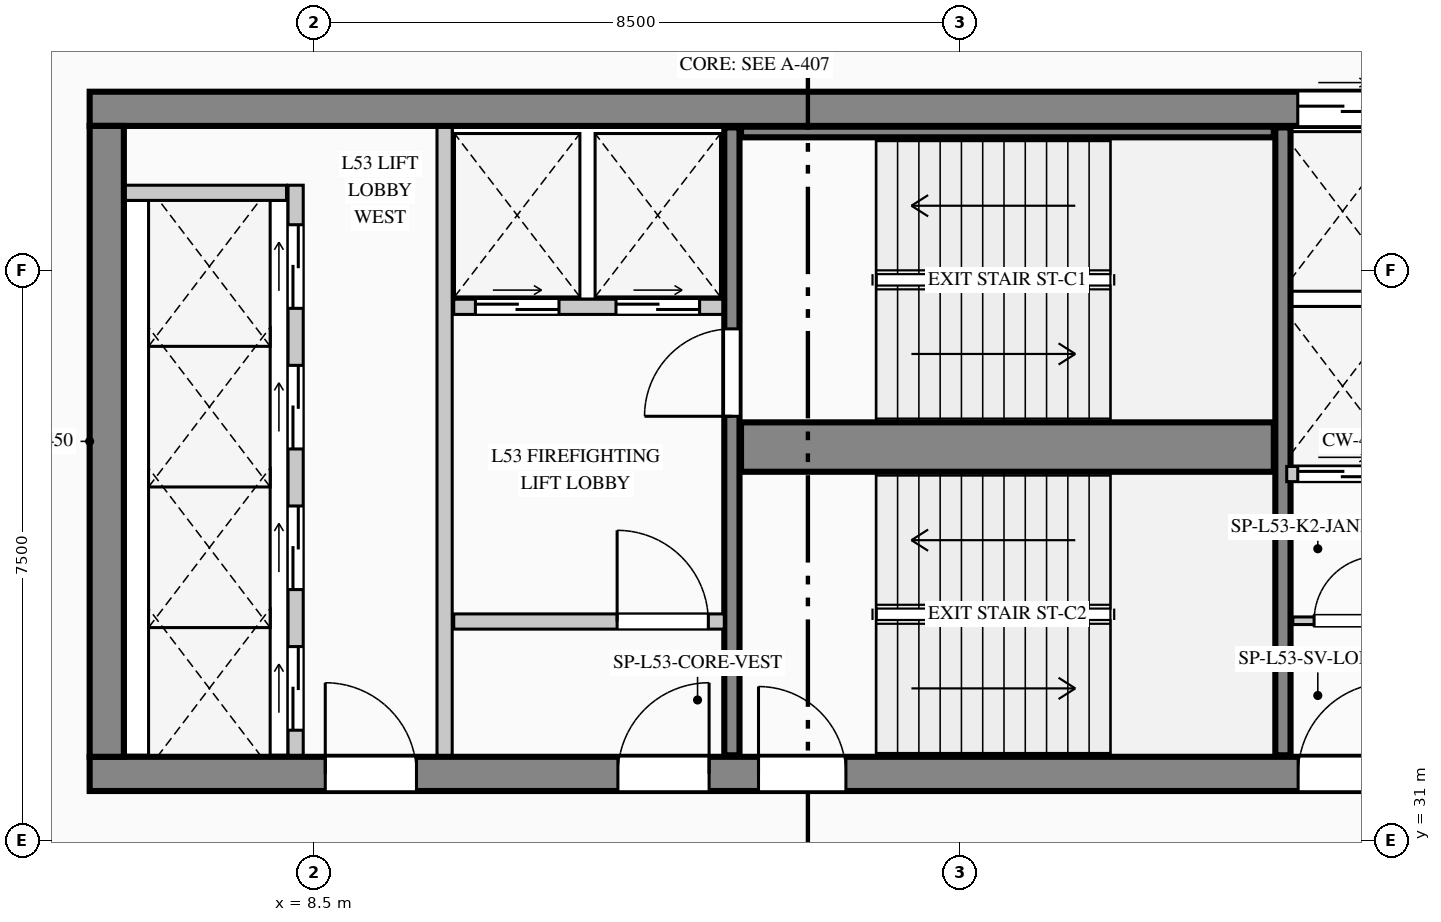
"""IFC4 building model, lengths in metres.
Left out: names, types, materials, properties, quantities, classifications, styles, units other than length and angle.
Written with IfcOpenShell. Run it as: python <this file> out.ifc"""

import sys

from ifc_helpers import new_model, si_unit, direction, frame, frame_2d, origin, place, context, subcontext, project, spatial, rectangle, extrude, element, fill, save


model = new_model("IFC4")
c1 = context("Model", 3, precision=1e-05, world=origin(), true_north=direction((0.0, 1.0)))
c2 = subcontext(c1, "Body", "Model", "MODEL_VIEW")
j1 = project(units=[si_unit("LENGTHUNIT", "METRE"), si_unit("PLANEANGLEUNIT", "RADIAN")], contexts=[c1])
p1 = place(None, origin())
s1 = spatial("IfcSite", under=j1, at=p1, CompositionType="ELEMENT")
p2 = place(p1, origin())
s2 = spatial("IfcBuilding", under=s1, at=p2, CompositionType="ELEMENT")
p3 = place(p2, frame((0.0, 0.0, 223.25)))
s3 = spatial("IfcBuildingStorey", under=s2, at=p3, CompositionType="ELEMENT", Elevation=223.25)
p4 = place(p3, frame((5.55, 40.625, 0.0), z_axis=(0.0, 0.0, 1.0), x_axis=(1.0, 0.0, 0.0)))
e1 = element("IfcWall", 1, at=p4, inside=s3, PredefinedType="SHEAR", context=c2, shape_type="SweptSolid", body=[
    extrude(rectangle(XDim=17.75, YDim=0.45, at=frame_2d((8.875, 0.0))), origin(), (0.0, 0.0, 1.0), 3.95),
])
p5 = place(p4, frame((15.895, 0.0, 0.0)))
e2 = element("IfcOpeningElement", 2, at=p5, cuts=e1, PredefinedType="OPENING", context=c2, shape_type="SweptSolid", body=[
    extrude(rectangle(XDim=1.18, YDim=2.25, at=frame_2d((0.59, 1.125))), frame((0.0, 0.235, 0.0), z_axis=(0.0, -1.0, 0.0), x_axis=(1.0, 0.0, 0.0)), (0.0, 0.0, 1.0), 0.47),
])
p6 = place(p3, frame((5.55, 31.875, 0.0), z_axis=(0.0, 0.0, 1.0), x_axis=(1.0, 0.0, 0.0)))
e3 = element("IfcWall", 3, at=p6, inside=s3, PredefinedType="SHEAR", context=c2, shape_type="SweptSolid", body=[
    extrude(rectangle(XDim=17.75, YDim=0.45, at=frame_2d((8.875, 0.0))), origin(), (0.0, 0.0, 1.0), 3.95),
])
p7 = place(p6, frame((3.1, 0.0, 0.0)))
e4 = element("IfcOpeningElement", 4, at=p7, cuts=e3, PredefinedType="OPENING", context=c2, shape_type="SweptSolid", body=[
    extrude(rectangle(XDim=1.2, YDim=2.2, at=frame_2d((0.6, 1.1))), frame((0.0, 0.235, 0.0), z_axis=(0.0, -1.0, 0.0), x_axis=(1.0, 0.0, 0.0)), (0.0, 0.0, 1.0), 0.47),
])
p8 = place(p6, frame((6.95, 0.0, 0.0)))
e5 = element("IfcOpeningElement", 5, at=p8, cuts=e3, PredefinedType="OPENING", context=c2, shape_type="SweptSolid", body=[
    extrude(rectangle(XDim=1.2, YDim=2.2, at=frame_2d((0.6, 1.1))), frame((0.0, 0.235, 0.0), z_axis=(0.0, -1.0, 0.0), x_axis=(1.0, 0.0, 0.0)), (0.0, 0.0, 1.0), 0.47),
])
p9 = place(p6, frame((8.8, 0.0, 0.0)))
e6 = element("IfcOpeningElement", 6, at=p9, cuts=e3, PredefinedType="OPENING", context=c2, shape_type="SweptSolid", body=[
    extrude(rectangle(XDim=1.15, YDim=2.2, at=frame_2d((0.575, 1.1))), frame((0.0, 0.235, 0.0), z_axis=(0.0, -1.0, 0.0), x_axis=(1.0, 0.0, 0.0)), (0.0, 0.0, 1.0), 0.47),
])
p10 = place(p6, frame((15.9, 0.0, 0.0)))
e7 = element("IfcOpeningElement", 7, at=p10, cuts=e3, PredefinedType="OPENING", context=c2, shape_type="SweptSolid", body=[
    extrude(rectangle(XDim=1.2, YDim=2.2, at=frame_2d((0.6, 1.1))), frame((0.0, 0.235, 0.0), z_axis=(0.0, -1.0, 0.0), x_axis=(1.0, 0.0, 0.0)), (0.0, 0.0, 1.0), 0.47),
])
p11 = place(p3, frame((5.775, 32.1, 0.0), z_axis=(0.0, 0.0, 1.0), x_axis=(0.0, 1.0, 0.0)))
e8 = element("IfcWall", 8, at=p11, inside=s3, PredefinedType="SHEAR", context=c2, shape_type="SweptSolid", body=[
    extrude(rectangle(XDim=8.3, YDim=0.45, at=frame_2d((4.15, 0.0))), origin(), (0.0, 0.0, 1.0), 3.95),
])
p12 = place(p3, frame((14.0, 32.12, 0.0), z_axis=(0.0, 0.0, 1.0), x_axis=(0.0, 1.0, 0.0)))
e9 = element("IfcWall", 9, at=p12, inside=s3, PredefinedType="SHEAR", context=c2, shape_type="SweptSolid", body=[
    extrude(rectangle(XDim=8.26, YDim=0.2, at=frame_2d((4.13, 0.0))), origin(), (0.0, 0.0, 1.0), 3.95),
])
p13 = place(p12, frame((4.46, 0.0, 0.0)))
e10 = element("IfcOpeningElement", 10, at=p13, cuts=e9, PredefinedType="OPENING", context=c2, shape_type="SweptSolid", body=[
    extrude(rectangle(XDim=1.15, YDim=2.2, at=frame_2d((0.575, 1.1))), frame((0.0, 0.11, 0.0), z_axis=(0.0, -1.0, 0.0), x_axis=(1.0, 0.0, 0.0)), (0.0, 0.0, 1.0), 0.22),
])
p14 = place(p3, frame((14.12, 36.175, 0.0), z_axis=(0.0, 0.0, 1.0), x_axis=(1.0, 0.0, 0.0)))
e11 = element("IfcWall", 11, at=p14, inside=s3, PredefinedType="SHEAR", context=c2, shape_type="SweptSolid", body=[
    extrude(rectangle(XDim=7.01, YDim=0.65, at=frame_2d((3.505, 0.0))), origin(), (0.0, 0.0, 1.0), 3.95),
])
p15 = place(p3, frame((21.25, 32.12, 0.0), z_axis=(0.0, 0.0, 1.0), x_axis=(0.0, 1.0, 0.0)))
e12 = element("IfcWall", 12, at=p15, inside=s3, PredefinedType="SHEAR", context=c2, shape_type="SweptSolid", body=[
    extrude(rectangle(XDim=8.26, YDim=0.2, at=frame_2d((4.13, 0.0))), origin(), (0.0, 0.0, 1.0), 3.95),
])
p16 = place(p3, frame((14.12, 40.32, 0.0), z_axis=(0.0, 0.0, 1.0), x_axis=(1.0, 0.0, 0.0)))
e13 = element("IfcWall", 13, at=p16, inside=s3, PredefinedType="SHEAR", context=c2, shape_type="SweptSolid", body=[
    extrude(rectangle(XDim=7.01, YDim=0.14, at=frame_2d((3.505, 0.0))), origin(), (0.0, 0.0, 1.0), 3.95),
])
p17 = place(p3, frame((7.46, 4.62, 0.0), z_axis=(0.0, 0.0, 1.0), x_axis=(-0.123515576323, 0.992342633573, 0.0)))
e14 = element("IfcWall", 14, at=p17, inside=s3, PredefinedType="STANDARD", context=c2, shape_type="SweptSolid", body=[
    extrude(rectangle(XDim=37.043, YDim=0.24, at=frame_2d((18.522, 0.0))), origin(), (0.0, 0.0, 1.0), 3.7),
])
p18 = place(p17, frame((9.536, 0.0, 0.9)))
e15 = element("IfcOpeningElement", 15, at=p18, cuts=e14, PredefinedType="OPENING", context=c2, shape_type="SweptSolid", body=[
    extrude(rectangle(XDim=2.7, YDim=2.1, at=frame_2d((1.35, 1.05))), frame((0.0, 0.13, 0.0), z_axis=(0.0, -1.0, 0.0), x_axis=(1.0, 0.0, 0.0)), (0.0, 0.0, 1.0), 0.26),
])
p19 = place(p3, frame((8.26, 32.12, 0.0), z_axis=(0.0, 0.0, 1.0), x_axis=(0.0, 1.0, 0.0)))
e16 = element("IfcWall", 16, at=p19, inside=s3, PredefinedType="PARTITIONING", context=c2, shape_type="SweptSolid", body=[
    extrude(rectangle(XDim=7.5, YDim=0.2, at=frame_2d((3.75, 0.0))), origin(), (0.0, 0.0, 1.0), 3.7),
])
p20 = place(p19, frame((0.33, 0.0, 0.0)))
e17 = element("IfcOpeningElement", 17, at=p20, cuts=e16, PredefinedType="OPENING", context=c2, shape_type="SweptSolid", body=[
    extrude(rectangle(XDim=1.1, YDim=2.2, at=frame_2d((0.55, 1.1))), frame((0.0, 0.11, 0.0), z_axis=(0.0, -1.0, 0.0), x_axis=(1.0, 0.0, 0.0)), (0.0, 0.0, 1.0), 0.22),
])
p21 = place(p19, frame((2.18, 0.0, 0.0)))
e18 = element("IfcOpeningElement", 18, at=p21, cuts=e16, PredefinedType="OPENING", context=c2, shape_type="SweptSolid", body=[
    extrude(rectangle(XDim=1.1, YDim=2.2, at=frame_2d((0.55, 1.1))), frame((0.0, 0.11, 0.0), z_axis=(0.0, -1.0, 0.0), x_axis=(1.0, 0.0, 0.0)), (0.0, 0.0, 1.0), 0.22),
])
p22 = place(p19, frame((4.03, 0.0, 0.0)))
e19 = element("IfcOpeningElement", 19, at=p22, cuts=e16, PredefinedType="OPENING", context=c2, shape_type="SweptSolid", body=[
    extrude(rectangle(XDim=1.1, YDim=2.2, at=frame_2d((0.55, 1.1))), frame((0.0, 0.11, 0.0), z_axis=(0.0, -1.0, 0.0), x_axis=(1.0, 0.0, 0.0)), (0.0, 0.0, 1.0), 0.22),
])
p23 = place(p19, frame((5.88, 0.0, 0.0)))
e20 = element("IfcOpeningElement", 20, at=p23, cuts=e16, PredefinedType="OPENING", context=c2, shape_type="SweptSolid", body=[
    extrude(rectangle(XDim=1.1, YDim=2.2, at=frame_2d((0.55, 1.1))), frame((0.0, 0.11, 0.0), z_axis=(0.0, -1.0, 0.0), x_axis=(1.0, 0.0, 0.0)), (0.0, 0.0, 1.0), 0.22),
])
p24 = place(p3, frame((6.02, 39.52, 0.0), z_axis=(0.0, 0.0, 1.0), x_axis=(1.0, 0.0, 0.0)))
e21 = element("IfcWall", 21, at=p24, inside=s3, PredefinedType="PARTITIONING", context=c2, shape_type="SweptSolid", body=[
    extrude(rectangle(XDim=2.12, YDim=0.2, at=frame_2d((1.06, 0.0))), origin(), (0.0, 0.0, 1.0), 3.7),
])
p25 = place(p3, frame((10.22, 32.12, 0.0), z_axis=(0.0, 0.0, 1.0), x_axis=(0.0, 1.0, 0.0)))
e22 = element("IfcWall", 22, at=p25, inside=s3, PredefinedType="PARTITIONING", context=c2, shape_type="SweptSolid", body=[
    extrude(rectangle(XDim=8.26, YDim=0.2, at=frame_2d((4.13, 0.0))), origin(), (0.0, 0.0, 1.0), 3.7),
])
p26 = place(p3, frame((10.34, 38.02, 0.0), z_axis=(0.0, 0.0, 1.0), x_axis=(1.0, 0.0, 0.0)))
e23 = element("IfcWall", 23, at=p26, inside=s3, PredefinedType="PARTITIONING", context=c2, shape_type="SweptSolid", body=[
    extrude(rectangle(XDim=3.54, YDim=0.2, at=frame_2d((1.77, 0.0))), origin(), (0.0, 0.0, 1.0), 3.7),
])
p27 = place(p26, frame((0.285, 0.0, 0.0)))
e24 = element("IfcOpeningElement", 24, at=p27, cuts=e23, PredefinedType="OPENING", context=c2, shape_type="SweptSolid", body=[
    extrude(rectangle(XDim=1.1, YDim=2.2, at=frame_2d((0.55, 1.1))), frame((0.0, 0.11, 0.0), z_axis=(0.0, -1.0, 0.0), x_axis=(1.0, 0.0, 0.0)), (0.0, 0.0, 1.0), 0.22),
])
p28 = place(p26, frame((2.135, 0.0, 0.0)))
e25 = element("IfcOpeningElement", 25, at=p28, cuts=e23, PredefinedType="OPENING", context=c2, shape_type="SweptSolid", body=[
    extrude(rectangle(XDim=1.1, YDim=2.2, at=frame_2d((0.55, 1.1))), frame((0.0, 0.11, 0.0), z_axis=(0.0, -1.0, 0.0), x_axis=(1.0, 0.0, 0.0)), (0.0, 0.0, 1.0), 0.22),
])
p29 = place(p3, frame((10.34, 33.88, 0.0), z_axis=(0.0, 0.0, 1.0), x_axis=(1.0, 0.0, 0.0)))
e26 = element("IfcWall", 26, at=p29, inside=s3, PredefinedType="PARTITIONING", context=c2, shape_type="SweptSolid", body=[
    extrude(rectangle(XDim=3.56, YDim=0.2, at=frame_2d((1.78, 0.0))), origin(), (0.0, 0.0, 1.0), 3.7),
])
p30 = place(p29, frame((2.15, 0.0, 0.0)))
e27 = element("IfcOpeningElement", 27, at=p30, cuts=e26, PredefinedType="OPENING", context=c2, shape_type="SweptSolid", body=[
    extrude(rectangle(XDim=1.2, YDim=2.2, at=frame_2d((0.6, 1.1))), frame((0.0, 0.11, 0.0), z_axis=(0.0, -1.0, 0.0), x_axis=(1.0, 0.0, 0.0)), (0.0, 0.0, 1.0), 0.22),
])
p31 = place(p3, frame((21.38, 33.89, 0.0), z_axis=(0.0, 0.0, 1.0), x_axis=(1.0, 0.0, 0.0)))
e28 = element("IfcWall", 28, at=p31, inside=s3, PredefinedType="PARTITIONING", context=c2, shape_type="SweptSolid", body=[
    extrude(rectangle(XDim=1.42, YDim=0.1, at=frame_2d((0.71, 0.0))), origin(), (0.0, 0.0, 1.0), 3.7),
])
p32 = place(p31, frame((0.28, 0.0, 0.0)))
e29 = element("IfcOpeningElement", 29, at=p32, cuts=e28, PredefinedType="OPENING", context=c2, shape_type="SweptSolid", body=[
    extrude(rectangle(XDim=0.85, YDim=2.1, at=frame_2d((0.425, 1.05))), frame((0.0, 0.06, 0.0), z_axis=(0.0, -1.0, 0.0), x_axis=(1.0, 0.0, 0.0)), (0.0, 0.0, 1.0), 0.12),
])
p33 = place(p3, frame((21.3, 35.82, 0.0), z_axis=(0.0, 0.0, 1.0), x_axis=(1.0, 0.0, 0.0)))
e30 = element("IfcWall", 30, at=p33, inside=s3, PredefinedType="PARTITIONING", context=c2, shape_type="SweptSolid", body=[
    extrude(rectangle(XDim=1.5, YDim=0.2, at=frame_2d((0.75, 0.0))), origin(), (0.0, 0.0, 1.0), 3.7),
])
p34 = place(p33, frame((0.145, 0.0, 0.0)))
e31 = element("IfcOpeningElement", 31, at=p34, cuts=e30, PredefinedType="OPENING", context=c2, shape_type="SweptSolid", body=[
    extrude(rectangle(XDim=1.18, YDim=2.25, at=frame_2d((0.59, 1.125))), frame((0.0, 0.11, 0.0), z_axis=(0.0, -1.0, 0.0), x_axis=(1.0, 0.0, 0.0)), (0.0, 0.0, 1.0), 0.22),
])
p35 = place(p7, origin())
e32 = element("IfcDoor", 32, at=p35, inside=s3, OperationType="SINGLE_SWING_LEFT", PredefinedType="DOOR", context=c2, shape_type="SweptSolid", body=[
    extrude(rectangle(XDim=1.2, YDim=2.2, at=frame_2d((0.6, 1.1))), frame((0.0, 0.025, 0.0), z_axis=(0.0, -1.0, 0.0), x_axis=(1.0, 0.0, 0.0)), (0.0, 0.0, 1.0), 0.05),
])
fill(e4, e32)
p36 = place(p8, origin())
e33 = element("IfcDoor", 33, at=p36, inside=s3, OperationType="SINGLE_SWING_RIGHT", PredefinedType="DOOR", context=c2, shape_type="SweptSolid", body=[
    extrude(rectangle(XDim=1.2, YDim=2.2, at=frame_2d((0.6, 1.1))), frame((0.0, 0.025, 0.0), z_axis=(0.0, -1.0, 0.0), x_axis=(1.0, 0.0, 0.0)), (0.0, 0.0, 1.0), 0.05),
])
fill(e5, e33)
p37 = place(p9, origin())
e34 = element("IfcDoor", 34, at=p37, inside=s3, OperationType="SINGLE_SWING_LEFT", PredefinedType="DOOR", context=c2, shape_type="SweptSolid", body=[
    extrude(rectangle(XDim=1.15, YDim=2.2, at=frame_2d((0.575, 1.1))), frame((0.0, 0.025, 0.0), z_axis=(0.0, -1.0, 0.0), x_axis=(1.0, 0.0, 0.0)), (0.0, 0.0, 1.0), 0.05),
])
fill(e6, e34)
p38 = place(p10, origin())
e35 = element("IfcDoor", 35, at=p38, inside=s3, OperationType="SINGLE_SWING_RIGHT", PredefinedType="DOOR", context=c2, shape_type="SweptSolid", body=[
    extrude(rectangle(XDim=1.2, YDim=2.2, at=frame_2d((0.6, 1.1))), frame((0.0, 0.025, 0.0), z_axis=(0.0, -1.0, 0.0), x_axis=(1.0, 0.0, 0.0)), (0.0, 0.0, 1.0), 0.05),
])
fill(e7, e35)
p39 = place(p30, origin())
e36 = element("IfcDoor", 36, at=p39, inside=s3, OperationType="SINGLE_SWING_LEFT", PredefinedType="DOOR", context=c2, shape_type="SweptSolid", body=[
    extrude(rectangle(XDim=1.2, YDim=2.2, at=frame_2d((0.6, 1.1))), frame((0.0, 0.025, 0.0), z_axis=(0.0, -1.0, 0.0), x_axis=(1.0, 0.0, 0.0)), (0.0, 0.0, 1.0), 0.05),
])
fill(e27, e36)
p40 = place(p32, origin())
e37 = element("IfcDoor", 37, at=p40, inside=s3, OperationType="SINGLE_SWING_RIGHT", PredefinedType="DOOR", context=c2, shape_type="SweptSolid", body=[
    extrude(rectangle(XDim=0.85, YDim=2.1, at=frame_2d((0.425, 1.05))), frame((0.0, 0.025, 0.0), z_axis=(0.0, -1.0, 0.0), x_axis=(1.0, 0.0, 0.0)), (0.0, 0.0, 1.0), 0.05),
])
fill(e29, e37)
p41 = place(p13, origin())
e38 = element("IfcDoor", 38, at=p41, inside=s3, OperationType="SINGLE_SWING_LEFT", PredefinedType="DOOR", context=c2, shape_type="SweptSolid", body=[
    extrude(rectangle(XDim=1.15, YDim=2.2, at=frame_2d((0.575, 1.1))), frame((0.0, 0.025, 0.0), z_axis=(0.0, -1.0, 0.0), x_axis=(1.0, 0.0, 0.0)), (0.0, 0.0, 1.0), 0.05),
])
fill(e10, e38)
p42 = place(p20, origin())
e39 = element("IfcDoor", 39, at=p42, inside=s3, OperationType="DOUBLE_DOOR_SLIDING", PredefinedType="DOOR", context=c2, shape_type="SweptSolid", body=[
    extrude(rectangle(XDim=1.1, YDim=2.2, at=frame_2d((0.55, 1.1))), frame((0.0, 0.025, 0.0), z_axis=(0.0, -1.0, 0.0), x_axis=(1.0, 0.0, 0.0)), (0.0, 0.0, 1.0), 0.05),
])
fill(e17, e39)
p43 = place(p21, origin())
e40 = element("IfcDoor", 40, at=p43, inside=s3, OperationType="DOUBLE_DOOR_SLIDING", PredefinedType="DOOR", context=c2, shape_type="SweptSolid", body=[
    extrude(rectangle(XDim=1.1, YDim=2.2, at=frame_2d((0.55, 1.1))), frame((0.0, 0.025, 0.0), z_axis=(0.0, -1.0, 0.0), x_axis=(1.0, 0.0, 0.0)), (0.0, 0.0, 1.0), 0.05),
])
fill(e18, e40)
p44 = place(p22, origin())
e41 = element("IfcDoor", 41, at=p44, inside=s3, OperationType="DOUBLE_DOOR_SLIDING", PredefinedType="DOOR", context=c2, shape_type="SweptSolid", body=[
    extrude(rectangle(XDim=1.1, YDim=2.2, at=frame_2d((0.55, 1.1))), frame((0.0, 0.025, 0.0), z_axis=(0.0, -1.0, 0.0), x_axis=(1.0, 0.0, 0.0)), (0.0, 0.0, 1.0), 0.05),
])
fill(e19, e41)
p45 = place(p23, origin())
e42 = element("IfcDoor", 42, at=p45, inside=s3, OperationType="DOUBLE_DOOR_SLIDING", PredefinedType="DOOR", context=c2, shape_type="SweptSolid", body=[
    extrude(rectangle(XDim=1.1, YDim=2.2, at=frame_2d((0.55, 1.1))), frame((0.0, 0.025, 0.0), z_axis=(0.0, -1.0, 0.0), x_axis=(1.0, 0.0, 0.0)), (0.0, 0.0, 1.0), 0.05),
])
fill(e20, e42)
p46 = place(p27, origin())
e43 = element("IfcDoor", 43, at=p46, inside=s3, OperationType="DOUBLE_DOOR_SLIDING", PredefinedType="DOOR", context=c2, shape_type="SweptSolid", body=[
    extrude(rectangle(XDim=1.1, YDim=2.2, at=frame_2d((0.55, 1.1))), frame((0.0, 0.025, 0.0), z_axis=(0.0, -1.0, 0.0), x_axis=(1.0, 0.0, 0.0)), (0.0, 0.0, 1.0), 0.05),
])
fill(e24, e43)
p47 = place(p28, origin())
e44 = element("IfcDoor", 44, at=p47, inside=s3, OperationType="DOUBLE_DOOR_SLIDING", PredefinedType="DOOR", context=c2, shape_type="SweptSolid", body=[
    extrude(rectangle(XDim=1.1, YDim=2.2, at=frame_2d((0.55, 1.1))), frame((0.0, 0.025, 0.0), z_axis=(0.0, -1.0, 0.0), x_axis=(1.0, 0.0, 0.0)), (0.0, 0.0, 1.0), 0.05),
])
fill(e25, e44)
p48 = place(p5, origin())
e45 = element("IfcDoor", 45, at=p48, inside=s3, OperationType="DOUBLE_DOOR_SLIDING", PredefinedType="DOOR", context=c2, shape_type="SweptSolid", body=[
    extrude(rectangle(XDim=1.18, YDim=2.25, at=frame_2d((0.59, 1.125))), frame((0.0, 0.025, 0.0), z_axis=(0.0, -1.0, 0.0), x_axis=(1.0, 0.0, 0.0)), (0.0, 0.0, 1.0), 0.05),
])
fill(e2, e45)
p49 = place(p34, origin())
e46 = element("IfcDoor", 46, at=p49, inside=s3, OperationType="DOUBLE_DOOR_SLIDING", PredefinedType="DOOR", context=c2, shape_type="SweptSolid", body=[
    extrude(rectangle(XDim=1.18, YDim=2.25, at=frame_2d((0.59, 1.125))), frame((0.0, 0.025, 0.0), z_axis=(0.0, -1.0, 0.0), x_axis=(1.0, 0.0, 0.0)), (0.0, 0.0, 1.0), 0.05),
])
fill(e31, e46)
save(model, sys.argv[1])
